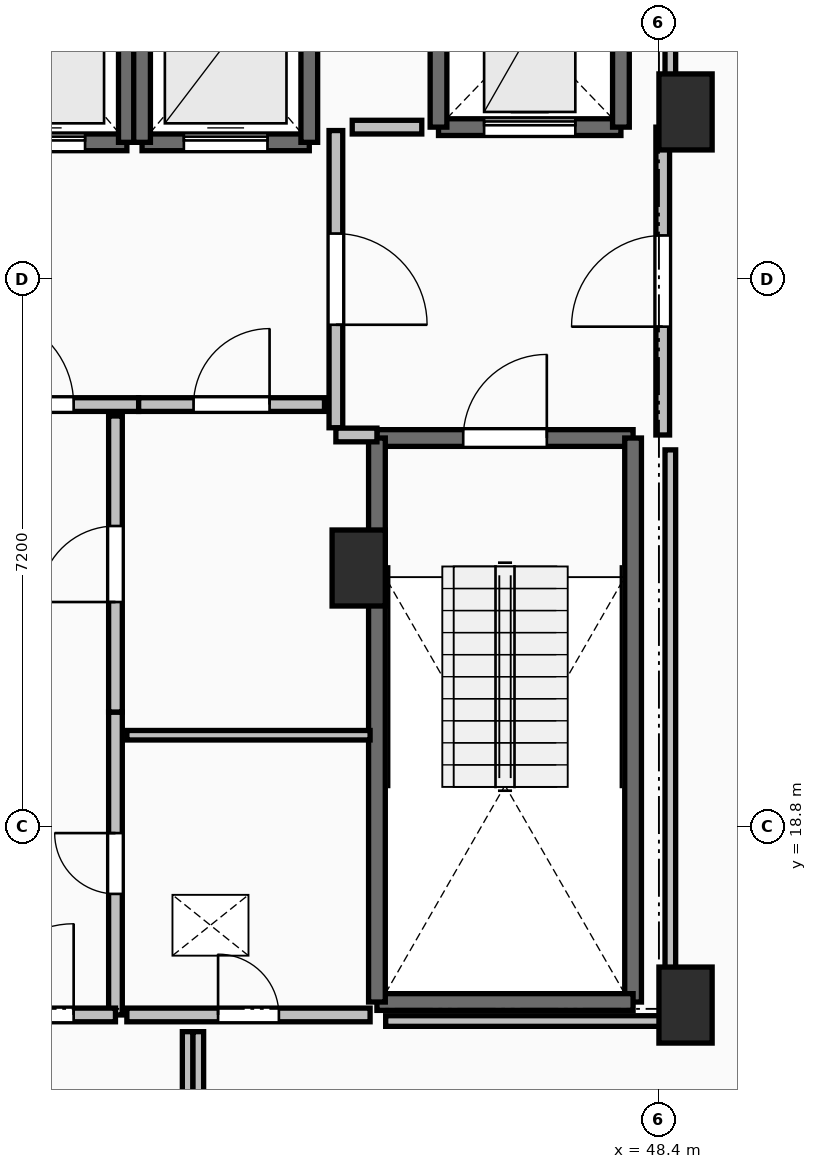
"""IFC4 building model, lengths in metres.
Left out: names, types, materials, properties, quantities, classifications, styles, units other than length and angle.
Written with IfcOpenShell. Run it as: python <this file> out.ifc"""

import sys

from ifc_helpers import new_model, si_unit, direction, frame, frame_2d, origin, origin_2d, place, context, subcontext, project, spatial, rectangle, extrude, element, fill, save


model = new_model("IFC4")
c1 = context("Model", 3, precision=1e-05, world=origin(), true_north=direction((0.0, 1.0)))
c2 = subcontext(c1, "Body", "Model", "MODEL_VIEW")
j1 = project(units=[si_unit("LENGTHUNIT", "METRE"), si_unit("PLANEANGLEUNIT", "RADIAN")], contexts=[c1])
p1 = place(None, origin())
s1 = spatial("IfcSite", under=j1, at=p1, CompositionType="ELEMENT")
p2 = place(p1, origin())
s2 = spatial("IfcBuilding", under=s1, at=p2, CompositionType="ELEMENT")
p3 = place(p2, frame((0.0, 0.0, 276.85)))
s3 = spatial("IfcBuildingStorey", under=s2, at=p3, CompositionType="ELEMENT", Elevation=276.85)
for number, where, z_axis, x_axis in (
    (1, (48.75, 28.2, 0.0), (0.0, 0.0, 1.0), (1.0, 0.0, 0.0)),
    (2, (48.75, 16.45, 0.0), (0.0, 0.0, 1.0), (1.0, 0.0, 0.0)),
    (3, (44.45, 22.2, 0.0), (0.0, 0.0, 1.0), (1.0, 0.0, 0.0)),
):
    element("IfcColumn", number, at=place(p3, frame(where, z_axis=z_axis, x_axis=x_axis)), inside=s3, PredefinedType="PILASTER", context=c2, shape_type="SweptSolid", body=[
        extrude(rectangle(XDim=0.7, YDim=1.0, at=origin_2d()), origin(), (0.0, 0.0, 1.0), 3.55),
    ])
p4 = place(p3, frame((44.69, 23.91, 0.0), z_axis=(0.0, 0.0, 1.0), x_axis=(1.0, 0.0, 0.0)))
e4 = element("IfcWall", 4, at=p4, inside=s3, PredefinedType="SOLIDWALL", context=c2, shape_type="SweptSolid", body=[
    extrude(rectangle(XDim=3.37, YDim=0.22, at=frame_2d((1.685, 0.0))), origin(), (0.0, 0.0, 1.0), 3.19),
])
p5 = place(p4, frame((1.135, 0.0, 0.0)))
e5 = element("IfcOpeningElement", 5, at=p5, cuts=e4, PredefinedType="OPENING", context=c2, shape_type="SweptSolid", body=[
    extrude(rectangle(XDim=1.1, YDim=2.15, at=frame_2d((0.55, 1.075))), frame((0.0, 0.125, 0.0), z_axis=(0.0, -1.0, 0.0), x_axis=(1.0, 0.0, 0.0)), (0.0, 0.0, 1.0), 0.25),
])
p6 = place(p3, frame((48.06, 23.91, 0.0), z_axis=(0.0, 0.0, 1.0), x_axis=(0.0, -1.0, 0.0)))
e6 = element("IfcWall", 6, at=p6, inside=s3, PredefinedType="SOLIDWALL", context=c2, shape_type="SweptSolid", body=[
    extrude(rectangle(XDim=7.42, YDim=0.22, at=frame_2d((3.71, 0.0))), origin(), (0.0, 0.0, 1.0), 3.19),
])
p7 = place(p3, frame((48.06, 16.49, 0.0), z_axis=(0.0, 0.0, 1.0), x_axis=(-1.0, 0.0, 0.0)))
e7 = element("IfcWall", 7, at=p7, inside=s3, PredefinedType="SOLIDWALL", context=c2, shape_type="SweptSolid", body=[
    extrude(rectangle(XDim=3.37, YDim=0.22, at=frame_2d((1.685, 0.0))), origin(), (0.0, 0.0, 1.0), 3.19),
])
p8 = place(p3, frame((44.69, 16.49, 0.0), z_axis=(0.0, 0.0, 1.0), x_axis=(0.0, 1.0, 0.0)))
e8 = element("IfcWall", 8, at=p8, inside=s3, PredefinedType="SOLIDWALL", context=c2, shape_type="SweptSolid", body=[
    extrude(rectangle(XDim=7.42, YDim=0.22, at=frame_2d((3.71, 0.0))), origin(), (0.0, 0.0, 1.0), 3.19),
])
p9 = place(p3, frame((39.2, 27.8, 0.0), z_axis=(0.0, 0.0, 1.0), x_axis=(1.0, 0.0, 0.0)))
e9 = element("IfcWall", 9, at=p9, inside=s3, PredefinedType="SOLIDWALL", context=c2, shape_type="SweptSolid", body=[
    extrude(rectangle(XDim=2.2, YDim=0.22, at=frame_2d((1.1, 0.0))), origin(), (0.0, 0.0, 1.0), 3.19),
])
p10 = place(p9, frame((0.55, 0.0, 0.0)))
e10 = element("IfcOpeningElement", 10, at=p10, cuts=e9, PredefinedType="OPENING", context=c2, shape_type="SweptSolid", body=[
    extrude(rectangle(XDim=1.1, YDim=2.2, at=frame_2d((0.55, 1.1))), frame((0.0, 0.125, 0.0), z_axis=(0.0, -1.0, 0.0), x_axis=(1.0, 0.0, 0.0)), (0.0, 0.0, 1.0), 0.25),
])
p11 = place(p3, frame((41.4, 27.8, 0.0), z_axis=(0.0, 0.0, 1.0), x_axis=(0.0, 1.0, 0.0)))
e11 = element("IfcWall", 11, at=p11, inside=s3, PredefinedType="SOLIDWALL", context=c2, shape_type="SweptSolid", body=[
    extrude(rectangle(XDim=2.6, YDim=0.22, at=frame_2d((1.3, 0.0))), origin(), (0.0, 0.0, 1.0), 3.19),
])
p12 = place(p3, frame((41.6, 27.8, 0.0), z_axis=(0.0, 0.0, 1.0), x_axis=(1.0, 0.0, 0.0)))
e12 = element("IfcWall", 12, at=p12, inside=s3, PredefinedType="SOLIDWALL", context=c2, shape_type="SweptSolid", body=[
    extrude(rectangle(XDim=2.2, YDim=0.22, at=frame_2d((1.1, 0.0))), origin(), (0.0, 0.0, 1.0), 3.19),
])
p13 = place(p12, frame((0.55, 0.0, 0.0)))
e13 = element("IfcOpeningElement", 13, at=p13, cuts=e12, PredefinedType="OPENING", context=c2, shape_type="SweptSolid", body=[
    extrude(rectangle(XDim=1.1, YDim=2.2, at=frame_2d((0.55, 1.1))), frame((0.0, 0.125, 0.0), z_axis=(0.0, -1.0, 0.0), x_axis=(1.0, 0.0, 0.0)), (0.0, 0.0, 1.0), 0.25),
])
for number, where, z_axis, x_axis in (
    (14, (43.8, 27.8, 0.0), (0.0, 0.0, 1.0), (0.0, 1.0, 0.0)),
    (15, (41.6, 30.4, 0.0), (0.0, 0.0, 1.0), (0.0, -1.0, 0.0)),
):
    element("IfcWall", number, at=place(p3, frame(where, z_axis=z_axis, x_axis=x_axis)), inside=s3, PredefinedType="SOLIDWALL", context=c2, shape_type="SweptSolid", body=[
        extrude(rectangle(XDim=2.6, YDim=0.22, at=frame_2d((1.3, 0.0))), origin(), (0.0, 0.0, 1.0), 3.19),
    ])
p14 = place(p3, frame((45.5, 28.0, 0.0), z_axis=(0.0, 0.0, 1.0), x_axis=(1.0, 0.0, 0.0)))
e16 = element("IfcWall", 16, at=p14, inside=s3, PredefinedType="SHEAR", context=c2, shape_type="SweptSolid", body=[
    extrude(rectangle(XDim=2.4, YDim=0.22, at=frame_2d((1.2, 0.0))), origin(), (0.0, 0.0, 1.0), 3.19),
])
p15 = place(p14, frame((0.6, 0.0, 0.0)))
e17 = element("IfcOpeningElement", 17, at=p15, cuts=e16, PredefinedType="OPENING", context=c2, shape_type="SweptSolid", body=[
    extrude(rectangle(XDim=1.2, YDim=2.2, at=frame_2d((0.6, 1.1))), frame((0.0, 0.125, 0.0), z_axis=(0.0, -1.0, 0.0), x_axis=(1.0, 0.0, 0.0)), (0.0, 0.0, 1.0), 0.25),
])
for number, where, z_axis, x_axis in (
    (18, (47.9, 28.0, 0.0), (0.0, 0.0, 1.0), (0.0, 1.0, 0.0)),
    (19, (45.5, 30.5, 0.0), (0.0, 0.0, 1.0), (0.0, -1.0, 0.0)),
):
    element("IfcWall", number, at=place(p3, frame(where, z_axis=z_axis, x_axis=x_axis)), inside=s3, PredefinedType="SHEAR", context=c2, shape_type="SweptSolid", body=[
        extrude(rectangle(XDim=2.5, YDim=0.22, at=frame_2d((1.25, 0.0))), origin(), (0.0, 0.0, 1.0), 3.19),
    ])
p16 = place(p3, frame((44.15, 27.955, 0.0), z_axis=(0.0, 0.0, 1.0), x_axis=(0.0, -1.0, 0.0)))
e20 = element("IfcWall", 20, at=p16, inside=s3, PredefinedType="PARTITIONING", context=c2, shape_type="SweptSolid", body=[
    extrude(rectangle(XDim=3.91, YDim=0.18, at=frame_2d((1.955, 0.0))), origin(), (0.0, 0.0, 1.0), 3.19),
])
p17 = place(p16, frame((1.355, 0.0, 0.0)))
e21 = element("IfcOpeningElement", 21, at=p17, cuts=e20, PredefinedType="OPENING", context=c2, shape_type="SweptSolid", body=[
    extrude(rectangle(XDim=1.2, YDim=2.15, at=frame_2d((0.6, 1.075))), frame((0.0, 0.105, 0.0), z_axis=(0.0, -1.0, 0.0), x_axis=(1.0, 0.0, 0.0)), (0.0, 0.0, 1.0), 0.21),
])
p18 = place(p3, frame((44.15, 23.95, 0.0), z_axis=(0.0, 0.0, 1.0), x_axis=(1.0, 0.0, 0.0)))
e22 = element("IfcWall", 22, at=p18, inside=s3, PredefinedType="PARTITIONING", context=c2, shape_type="SweptSolid", body=[
    extrude(rectangle(XDim=0.54, YDim=0.18, at=frame_2d((0.27, 0.0))), origin(), (0.0, 0.0, 1.0), 3.19),
])
p19 = place(p3, frame((48.45, 23.95, 0.0), z_axis=(0.0, 0.0, 1.0), x_axis=(0.0, 1.0, 0.0)))
e23 = element("IfcWall", 23, at=p19, inside=s3, PredefinedType="PARTITIONING", context=c2, shape_type="SweptSolid", body=[
    extrude(rectangle(XDim=4.05, YDim=0.18, at=frame_2d((2.025, 0.0))), origin(), (0.0, 0.0, 1.0), 3.19),
])
p20 = place(p19, frame((1.425, 0.0, 0.0)))
e24 = element("IfcOpeningElement", 24, at=p20, cuts=e23, PredefinedType="OPENING", context=c2, shape_type="SweptSolid", body=[
    extrude(rectangle(XDim=1.2, YDim=2.15, at=frame_2d((0.6, 1.075))), frame((0.0, 0.105, 0.0), z_axis=(0.0, -1.0, 0.0), x_axis=(1.0, 0.0, 0.0)), (0.0, 0.0, 1.0), 0.21),
])
p21 = place(p3, frame((38.645, 24.35, 0.0), z_axis=(0.0, 0.0, 1.0), x_axis=(1.0, 0.0, 0.0)))
e25 = element("IfcWall", 25, at=p21, inside=s3, PredefinedType="PARTITIONING", context=c2, shape_type="SweptSolid", body=[
    extrude(rectangle(XDim=2.91, YDim=0.18, at=frame_2d((1.455, 0.0))), origin(), (0.0, 0.0, 1.0), 3.19),
])
p22 = place(p21, frame((0.855, 0.0, 0.0)))
e26 = element("IfcOpeningElement", 26, at=p22, cuts=e25, PredefinedType="OPENING", context=c2, shape_type="SweptSolid", body=[
    extrude(rectangle(XDim=1.2, YDim=2.15, at=frame_2d((0.6, 1.075))), frame((0.0, 0.105, 0.0), z_axis=(0.0, -1.0, 0.0), x_axis=(1.0, 0.0, 0.0)), (0.0, 0.0, 1.0), 0.21),
])
p23 = place(p3, frame((41.555, 24.35, 0.0), z_axis=(0.0, 0.0, 1.0), x_axis=(1.0, 0.0, 0.0)))
e27 = element("IfcWall", 27, at=p23, inside=s3, PredefinedType="PARTITIONING", context=c2, shape_type="SweptSolid", body=[
    extrude(rectangle(XDim=2.445, YDim=0.18, at=frame_2d((1.223, 0.0))), origin(), (0.0, 0.0, 1.0), 3.19),
])
p24 = place(p23, frame((0.722, 0.0, 0.0)))
e28 = element("IfcOpeningElement", 28, at=p24, cuts=e27, PredefinedType="OPENING", context=c2, shape_type="SweptSolid", body=[
    extrude(rectangle(XDim=1.0, YDim=2.15, at=frame_2d((0.5, 1.075))), frame((0.0, 0.105, 0.0), z_axis=(0.0, -1.0, 0.0), x_axis=(1.0, 0.0, 0.0)), (0.0, 0.0, 1.0), 0.21),
])
p25 = place(p3, frame((41.25, 16.32, 0.0), z_axis=(0.0, 0.0, 1.0), x_axis=(0.0, 1.0, 0.0)))
e29 = element("IfcWall", 29, at=p25, inside=s3, PredefinedType="PARTITIONING", context=c2, shape_type="SweptSolid", body=[
    extrude(rectangle(XDim=3.985, YDim=0.18, at=frame_2d((1.992, 0.0))), origin(), (0.0, 0.0, 1.0), 3.19),
])
p26 = place(p25, frame((1.593, 0.0, 0.0)))
e30 = element("IfcOpeningElement", 30, at=p26, cuts=e29, PredefinedType="OPENING", context=c2, shape_type="SweptSolid", body=[
    extrude(rectangle(XDim=0.8, YDim=2.05, at=frame_2d((0.4, 1.025))), frame((0.0, 0.105, 0.0), z_axis=(0.0, -1.0, 0.0), x_axis=(1.0, 0.0, 0.0)), (0.0, 0.0, 1.0), 0.21),
])
p27 = place(p3, frame((41.25, 20.305, 0.0), z_axis=(0.0, 0.0, 1.0), x_axis=(0.0, 1.0, 0.0)))
e31 = element("IfcWall", 31, at=p27, inside=s3, PredefinedType="PARTITIONING", context=c2, shape_type="SweptSolid", body=[
    extrude(rectangle(XDim=3.895, YDim=0.18, at=frame_2d((1.948, 0.0))), origin(), (0.0, 0.0, 1.0), 3.19),
])
p28 = place(p27, frame((1.448, 0.0, 0.0)))
e32 = element("IfcOpeningElement", 32, at=p28, cuts=e31, PredefinedType="OPENING", context=c2, shape_type="SweptSolid", body=[
    extrude(rectangle(XDim=1.0, YDim=2.15, at=frame_2d((0.5, 1.075))), frame((0.0, 0.105, 0.0), z_axis=(0.0, -1.0, 0.0), x_axis=(1.0, 0.0, 0.0)), (0.0, 0.0, 1.0), 0.21),
])
p29 = place(p3, frame((38.95, 16.32, 0.0), z_axis=(0.0, 0.0, 1.0), x_axis=(1.0, 0.0, 0.0)))
e33 = element("IfcWall", 33, at=p29, inside=s3, PredefinedType="PARTITIONING", context=c2, shape_type="SweptSolid", body=[
    extrude(rectangle(XDim=2.3, YDim=0.18, at=frame_2d((1.15, 0.0))), origin(), (0.0, 0.0, 1.0), 3.19),
])
p30 = place(p29, frame((0.55, 0.0, 0.0)))
e34 = element("IfcOpeningElement", 34, at=p30, cuts=e33, PredefinedType="OPENING", context=c2, shape_type="SweptSolid", body=[
    extrude(rectangle(XDim=1.2, YDim=2.15, at=frame_2d((0.6, 1.075))), frame((0.0, 0.105, 0.0), z_axis=(0.0, -1.0, 0.0), x_axis=(1.0, 0.0, 0.0)), (0.0, 0.0, 1.0), 0.21),
])
p31 = place(p3, frame((44.6, 20.0, 0.0), z_axis=(0.0, 0.0, 1.0), x_axis=(-1.0, 0.0, 0.0)))
e35 = element("IfcWall", 35, at=p31, inside=s3, PredefinedType="PARTITIONING", context=c2, shape_type="SweptSolid", body=[
    extrude(rectangle(XDim=3.2, YDim=0.125, at=frame_2d((1.6, 0.0))), origin(), (0.0, 0.0, 1.0), 3.19),
])
p32 = place(p3, frame((41.4, 16.32, 0.0), z_axis=(0.0, 0.0, 1.0), x_axis=(1.0, 0.0, 0.0)))
e36 = element("IfcWall", 36, at=p32, inside=s3, PredefinedType="PARTITIONING", context=c2, shape_type="SweptSolid", body=[
    extrude(rectangle(XDim=3.2, YDim=0.18, at=frame_2d((1.6, 0.0))), origin(), (0.0, 0.0, 1.0), 3.19),
])
p33 = place(p32, frame((1.2, 0.0, 0.0)))
e37 = element("IfcOpeningElement", 37, at=p33, cuts=e36, PredefinedType="OPENING", context=c2, shape_type="SweptSolid", body=[
    extrude(rectangle(XDim=0.8, YDim=2.05, at=frame_2d((0.4, 1.025))), frame((0.0, 0.105, 0.0), z_axis=(0.0, -1.0, 0.0), x_axis=(1.0, 0.0, 0.0)), (0.0, 0.0, 1.0), 0.21),
])
p34 = place(p3, frame((45.28, 28.0, 0.0), z_axis=(0.0, 0.0, 1.0), x_axis=(-1.0, 0.0, 0.0)))
e38 = element("IfcWall", 38, at=p34, inside=s3, PredefinedType="PARTITIONING", context=c2, shape_type="SweptSolid", body=[
    extrude(rectangle(XDim=0.915, YDim=0.18, at=frame_2d((0.458, 0.0))), origin(), (0.0, 0.0, 1.0), 3.19),
])
p35 = place(p3, frame((44.805, 16.24, 0.0), z_axis=(0.0, 0.0, 1.0), x_axis=(1.0, 0.0, 0.0)))
e39 = element("IfcWall", 39, at=p35, inside=s3, PredefinedType="PARTITIONING", context=c2, shape_type="SweptSolid", body=[
    extrude(rectangle(XDim=3.745, YDim=0.14, at=frame_2d((1.873, 0.0))), origin(), (0.0, 0.0, 1.0), 2.382),
])
p36 = place(p3, frame((48.55, 16.24, 0.0), z_axis=(0.0, 0.0, 1.0), x_axis=(0.0, 1.0, 0.0)))
e40 = element("IfcWall", 40, at=p36, inside=s3, PredefinedType="PARTITIONING", context=c2, shape_type="SweptSolid", body=[
    extrude(rectangle(XDim=7.514, YDim=0.14, at=frame_2d((3.757, 0.0))), origin(), (0.0, 0.0, 1.0), 2.382),
])
p37 = place(p3, frame((48.55, 28.196, 0.0), z_axis=(0.0, 0.0, 1.0), x_axis=(0.0, 1.0, 0.0)))
e41 = element("IfcWall", 41, at=p37, inside=s3, PredefinedType="PARTITIONING", context=c2, shape_type="SweptSolid", body=[
    extrude(rectangle(XDim=5.254, YDim=0.14, at=frame_2d((2.627, 0.0))), origin(), (0.0, 0.0, 1.0), 2.382),
])
for number, where, z_axis, x_axis in (
    (42, (42.2, 16.1, 0.0), (0.0, 0.0, 1.0), (0.0, -1.0, 0.0)),
    (43, (42.34, 14.25, 0.0), (0.0, 0.0, 1.0), (0.0, 1.0, 0.0)),
):
    element("IfcWall", number, at=place(p3, frame(where, z_axis=z_axis, x_axis=x_axis)), inside=s3, PredefinedType="PARTITIONING", context=c2, shape_type="SweptSolid", body=[
        extrude(rectangle(XDim=1.85, YDim=0.14, at=frame_2d((0.925, 0.0))), origin(), (0.0, 0.0, 1.0), 3.19),
    ])
p38 = place(p5, origin())
e44 = element("IfcDoor", 44, at=p38, inside=s3, OperationType="SINGLE_SWING_RIGHT", PredefinedType="DOOR", context=c2, shape_type="SweptSolid", body=[
    extrude(rectangle(XDim=1.1, YDim=2.15, at=frame_2d((0.55, 1.075))), frame((0.0, 0.025, 0.0), z_axis=(0.0, -1.0, 0.0), x_axis=(1.0, 0.0, 0.0)), (0.0, 0.0, 1.0), 0.05),
])
fill(e5, e44)
p39 = place(p10, origin())
e45 = element("IfcDoor", 45, at=p39, inside=s3, OperationType="SLIDING_TO_LEFT", PredefinedType="DOOR", context=c2, shape_type="SweptSolid", body=[
    extrude(rectangle(XDim=1.1, YDim=2.2, at=frame_2d((0.55, 1.1))), frame((0.0, 0.025, 0.0), z_axis=(0.0, -1.0, 0.0), x_axis=(1.0, 0.0, 0.0)), (0.0, 0.0, 1.0), 0.05),
])
fill(e10, e45)
p40 = place(p13, origin())
e46 = element("IfcDoor", 46, at=p40, inside=s3, OperationType="SLIDING_TO_LEFT", PredefinedType="DOOR", context=c2, shape_type="SweptSolid", body=[
    extrude(rectangle(XDim=1.1, YDim=2.2, at=frame_2d((0.55, 1.1))), frame((0.0, 0.025, 0.0), z_axis=(0.0, -1.0, 0.0), x_axis=(1.0, 0.0, 0.0)), (0.0, 0.0, 1.0), 0.05),
])
fill(e13, e46)
p41 = place(p15, origin())
e47 = element("IfcDoor", 47, at=p41, inside=s3, OperationType="SLIDING_TO_LEFT", PredefinedType="DOOR", context=c2, shape_type="SweptSolid", body=[
    extrude(rectangle(XDim=1.2, YDim=2.2, at=frame_2d((0.6, 1.1))), frame((0.0, 0.025, 0.0), z_axis=(0.0, -1.0, 0.0), x_axis=(1.0, 0.0, 0.0)), (0.0, 0.0, 1.0), 0.05),
])
fill(e17, e47)
p42 = place(p17, origin())
e48 = element("IfcDoor", 48, at=p42, inside=s3, OperationType="SINGLE_SWING_RIGHT", PredefinedType="DOOR", context=c2, shape_type="SweptSolid", body=[
    extrude(rectangle(XDim=1.2, YDim=2.15, at=frame_2d((0.6, 1.075))), frame((0.0, 0.025, 0.0), z_axis=(0.0, -1.0, 0.0), x_axis=(1.0, 0.0, 0.0)), (0.0, 0.0, 1.0), 0.05),
])
fill(e21, e48)
p43 = place(p20, origin())
e49 = element("IfcDoor", 49, at=p43, inside=s3, OperationType="SINGLE_SWING_LEFT", PredefinedType="DOOR", context=c2, shape_type="SweptSolid", body=[
    extrude(rectangle(XDim=1.2, YDim=2.15, at=frame_2d((0.6, 1.075))), frame((0.0, 0.025, 0.0), z_axis=(0.0, -1.0, 0.0), x_axis=(1.0, 0.0, 0.0)), (0.0, 0.0, 1.0), 0.05),
])
fill(e24, e49)
p44 = place(p22, origin())
e50 = element("IfcDoor", 50, at=p44, inside=s3, OperationType="SINGLE_SWING_LEFT", PredefinedType="DOOR", context=c2, shape_type="SweptSolid", body=[
    extrude(rectangle(XDim=1.2, YDim=2.15, at=frame_2d((0.6, 1.075))), frame((0.0, 0.025, 0.0), z_axis=(0.0, -1.0, 0.0), x_axis=(1.0, 0.0, 0.0)), (0.0, 0.0, 1.0), 0.05),
])
fill(e26, e50)
p45 = place(p24, origin())
e51 = element("IfcDoor", 51, at=p45, inside=s3, OperationType="SINGLE_SWING_RIGHT", PredefinedType="DOOR", context=c2, shape_type="SweptSolid", body=[
    extrude(rectangle(XDim=1.0, YDim=2.15, at=frame_2d((0.5, 1.075))), frame((0.0, 0.025, 0.0), z_axis=(0.0, -1.0, 0.0), x_axis=(1.0, 0.0, 0.0)), (0.0, 0.0, 1.0), 0.05),
])
fill(e28, e51)
p46 = place(p26, origin())
e52 = element("IfcDoor", 52, at=p46, inside=s3, OperationType="SINGLE_SWING_RIGHT", PredefinedType="DOOR", context=c2, shape_type="SweptSolid", body=[
    extrude(rectangle(XDim=0.8, YDim=2.05, at=frame_2d((0.4, 1.025))), frame((0.0, 0.025, 0.0), z_axis=(0.0, -1.0, 0.0), x_axis=(1.0, 0.0, 0.0)), (0.0, 0.0, 1.0), 0.05),
])
fill(e30, e52)
p47 = place(p28, origin())
e53 = element("IfcDoor", 53, at=p47, inside=s3, OperationType="SINGLE_SWING_LEFT", PredefinedType="DOOR", context=c2, shape_type="SweptSolid", body=[
    extrude(rectangle(XDim=1.0, YDim=2.15, at=frame_2d((0.5, 1.075))), frame((0.0, 0.025, 0.0), z_axis=(0.0, -1.0, 0.0), x_axis=(1.0, 0.0, 0.0)), (0.0, 0.0, 1.0), 0.05),
])
fill(e32, e53)
p48 = place(p30, origin())
e54 = element("IfcDoor", 54, at=p48, inside=s3, OperationType="SINGLE_SWING_RIGHT", PredefinedType="DOOR", context=c2, shape_type="SweptSolid", body=[
    extrude(rectangle(XDim=1.2, YDim=2.15, at=frame_2d((0.6, 1.075))), frame((0.0, 0.025, 0.0), z_axis=(0.0, -1.0, 0.0), x_axis=(1.0, 0.0, 0.0)), (0.0, 0.0, 1.0), 0.05),
])
fill(e34, e54)
p49 = place(p33, origin())
e55 = element("IfcDoor", 55, at=p49, inside=s3, OperationType="SINGLE_SWING_LEFT", PredefinedType="DOOR", context=c2, shape_type="SweptSolid", body=[
    extrude(rectangle(XDim=0.8, YDim=2.05, at=frame_2d((0.4, 1.025))), frame((0.0, 0.025, 0.0), z_axis=(0.0, -1.0, 0.0), x_axis=(1.0, 0.0, 0.0)), (0.0, 0.0, 1.0), 0.05),
])
fill(e37, e55)
save(model, sys.argv[1])
